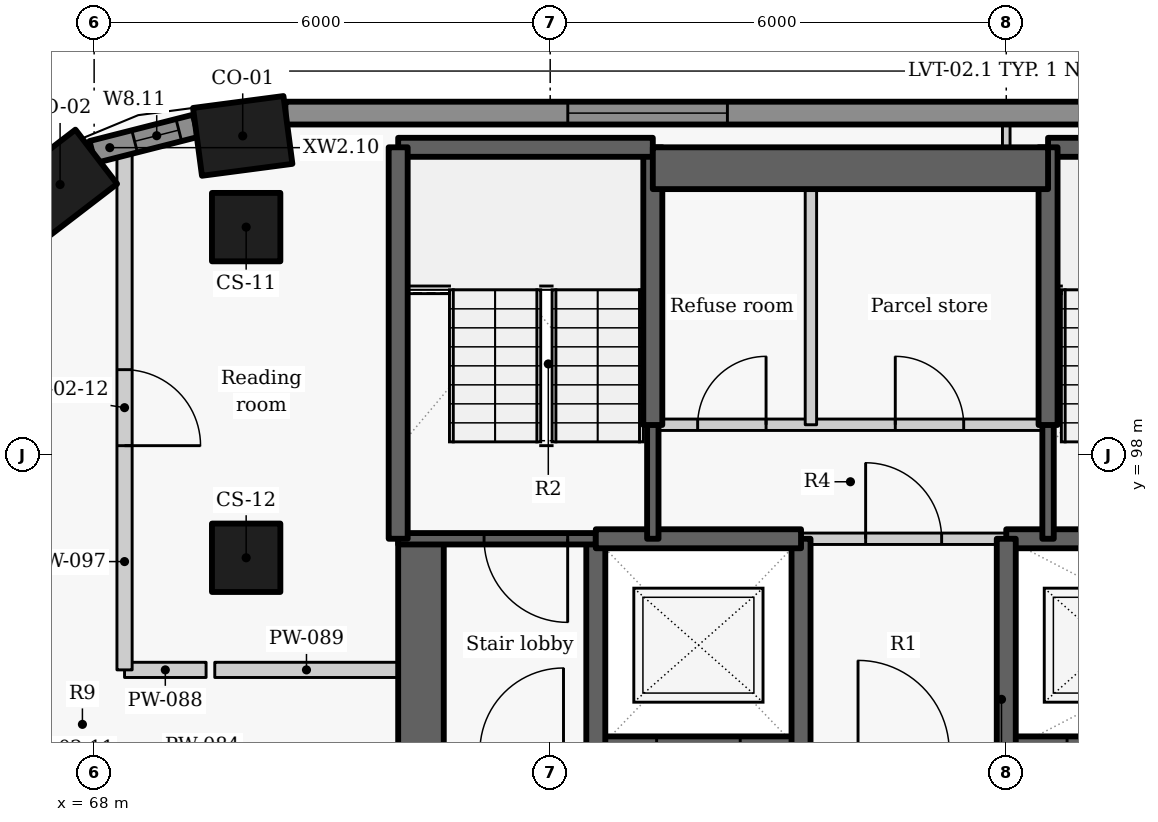
"""IFC4 building model, lengths in metres.
Left out: names, types, materials, properties, quantities, classifications, styles, units other than length and angle.
Written with IfcOpenShell. Run it as: python <this file> out.ifc"""

import sys

from ifc_helpers import new_model, si_unit, direction, frame, frame_2d, origin, origin_2d, place, context, subcontext, project, spatial, rectangle, extrude, element, fill, save


model = new_model("IFC4")
c1 = context("Model", 3, precision=1e-05, world=origin(), true_north=direction((0.0, 1.0)))
c2 = subcontext(c1, "Body", "Model", "MODEL_VIEW")
j1 = project(units=[si_unit("LENGTHUNIT", "METRE"), si_unit("PLANEANGLEUNIT", "RADIAN")], contexts=[c1])
p1 = place(None, origin())
s1 = spatial("IfcSite", under=j1, at=p1, CompositionType="ELEMENT")
p2 = place(p1, origin())
s2 = spatial("IfcBuilding", under=s1, at=p2, CompositionType="ELEMENT")
p3 = place(p2, frame((0.0, 0.0, 213.0)))
s3 = spatial("IfcBuildingStorey", under=s2, at=p3, CompositionType="ELEMENT", Elevation=213.0)
for number, where, z_axis, x_axis in (
    (1, (69.955, 102.2, 0.0), (0.0, 0.0, 1.0), (-0.991, -0.131, 0.0)),
    (2, (67.552, 101.56, 0.0), (0.0, 0.0, 1.0), (-0.793, -0.609, 0.0)),
):
    element("IfcColumn", number, at=place(p3, frame(where, z_axis=z_axis, x_axis=x_axis)), inside=s3, PredefinedType="COLUMN", context=c2, shape_type="SweptSolid", body=[
        extrude(rectangle(XDim=1.2, YDim=0.9, at=origin_2d()), origin(), (0.0, 0.0, 1.0), 3.3),
    ])
for number, where, z_axis, x_axis in (
    (3, (70.0, 101.0, 0.0), (0.0, 0.0, 1.0), (0.0, -1.0, 0.0)),
    (4, (70.0, 96.65, 0.0), (0.0, 0.0, 1.0), (0.0, -1.0, 0.0)),
):
    element("IfcColumn", number, at=place(p3, frame(where, z_axis=z_axis, x_axis=x_axis)), inside=s3, PredefinedType="COLUMN", context=c2, shape_type="SweptSolid", body=[
        extrude(rectangle(XDim=0.9, YDim=0.9, at=origin_2d()), origin(), (0.0, 0.0, 1.0), 3.3),
    ])
p4 = place(p3, frame((89.449, 102.5, 0.0), z_axis=(0.0, 0.0, 1.0), x_axis=(-1.0, 0.0, 0.0)))
e5 = element("IfcWall", 5, at=p4, inside=s3, PredefinedType="SOLIDWALL", context=c2, shape_type="SweptSolid", body=[
    extrude(rectangle(XDim=18.933, YDim=0.3, at=frame_2d((9.466, 0.0))), origin(), (0.0, 0.0, 1.0), 2.425),
])
p5 = place(p4, frame((3.687, 0.0, 0.9)))
e6 = element("IfcOpeningElement", 6, at=p5, cuts=e5, PredefinedType="OPENING", context=c2, shape_type="SweptSolid", body=[
    extrude(rectangle(XDim=2.1, YDim=1.1, at=frame_2d((1.05, 0.55))), frame((0.0, 0.16, 0.0), z_axis=(0.0, -1.0, 0.0), x_axis=(1.0, 0.0, 0.0)), (0.0, 0.0, 1.0), 0.32),
])
p6 = place(p4, frame((13.118, 0.0, 0.9)))
e7 = element("IfcOpeningElement", 7, at=p6, cuts=e5, PredefinedType="OPENING", context=c2, shape_type="SweptSolid", body=[
    extrude(rectangle(XDim=2.1, YDim=1.1, at=frame_2d((1.05, 0.55))), frame((0.0, 0.16, 0.0), z_axis=(0.0, -1.0, 0.0), x_axis=(1.0, 0.0, 0.0)), (0.0, 0.0, 1.0), 0.32),
])
p7 = place(p3, frame((69.336, 102.333, 0.0), z_axis=(0.0, 0.0, 1.0), x_axis=(-0.969037396898, -0.246914000036, 0.0)))
e8 = element("IfcWall", 8, at=p7, inside=s3, PredefinedType="SOLIDWALL", context=c2, shape_type="SweptSolid", body=[
    extrude(rectangle(XDim=1.403, YDim=0.3, at=frame_2d((0.702, 0.0))), origin(), (0.0, 0.0, 1.0), 2.425),
])
p8 = place(p7, frame((0.229, 0.0, 0.9)))
e9 = element("IfcOpeningElement", 9, at=p8, cuts=e8, PredefinedType="OPENING", context=c2, shape_type="SweptSolid", body=[
    extrude(rectangle(XDim=0.6, YDim=1.1, at=frame_2d((0.3, 0.55))), frame((0.0, 0.16, 0.0), z_axis=(0.0, -1.0, 0.0), x_axis=(1.0, 0.0, 0.0)), (0.0, 0.0, 1.0), 0.32),
])
p9 = place(p3, frame((72.3, 87.8, -0.275), z_axis=(0.0, 0.0, 1.0), x_axis=(0.0, 1.0, 0.0)))
e10 = element("IfcWall", 10, at=p9, inside=s3, PredefinedType="SHEAR", context=c2, shape_type="SweptSolid", body=[
    extrude(rectangle(XDim=9.1, YDim=0.6, at=frame_2d((4.55, 0.0))), origin(), (0.0, 0.0, 1.0), 3.3),
])
p10 = place(p9, frame((3.852, 0.0, 0.275)))
e11 = element("IfcOpeningElement", 11, at=p10, cuts=e10, PredefinedType="OPENING", context=c2, shape_type="SweptSolid", body=[
    extrude(rectangle(XDim=1.5, YDim=2.1, at=frame_2d((0.75, 1.05))), frame((0.0, 0.31, 0.0), z_axis=(0.0, -1.0, 0.0), x_axis=(1.0, 0.0, 0.0)), (0.0, 0.0, 1.0), 0.62),
])
p11 = place(p3, frame((74.597, 94.1, -0.275), z_axis=(0.0, 0.0, 1.0), x_axis=(1.0, 0.0, 0.0)))
e12 = element("IfcWall", 12, at=p11, inside=s3, PredefinedType="SHEAR", context=c2, shape_type="SweptSolid", body=[
    extrude(rectangle(XDim=2.706, YDim=0.4, at=frame_2d((1.353, 0.0))), origin(), (0.0, 0.0, 1.0), 3.3),
])
p12 = place(p11, frame((0.803, 0.0, 0.275)))
e13 = element("IfcOpeningElement", 13, at=p12, cuts=e12, PredefinedType="OPENING", context=c2, shape_type="SweptSolid", body=[
    extrude(rectangle(XDim=1.1, YDim=2.1, at=frame_2d((0.55, 1.05))), frame((0.0, 0.21, 0.0), z_axis=(0.0, -1.0, 0.0), x_axis=(1.0, 0.0, 0.0)), (0.0, 0.0, 1.0), 0.42),
])
p13 = place(p3, frame((79.997, 94.1, -0.275), z_axis=(0.0, 0.0, 1.0), x_axis=(1.0, 0.0, 0.0)))
e14 = element("IfcWall", 14, at=p13, inside=s3, PredefinedType="SHEAR", context=c2, shape_type="SweptSolid", body=[
    extrude(rectangle(XDim=5.406, YDim=0.4, at=frame_2d((2.703, 0.0))), origin(), (0.0, 0.0, 1.0), 3.3),
])
p14 = place(p13, frame((0.803, 0.0, 0.275)))
e15 = element("IfcOpeningElement", 15, at=p14, cuts=e14, PredefinedType="OPENING", context=c2, shape_type="SweptSolid", body=[
    extrude(rectangle(XDim=1.1, YDim=2.1, at=frame_2d((0.55, 1.05))), frame((0.0, 0.21, 0.0), z_axis=(0.0, -1.0, 0.0), x_axis=(1.0, 0.0, 0.0)), (0.0, 0.0, 1.0), 0.42),
])
p15 = place(p3, frame((74.6, 94.1, -0.275), z_axis=(0.0, 0.0, 1.0), x_axis=(0.0, 1.0, 0.0)))
e16 = element("IfcWall", 16, at=p15, inside=s3, PredefinedType="SHEAR", context=c2, shape_type="SweptSolid", body=[
    extrude(rectangle(XDim=2.8, YDim=0.25, at=frame_2d((1.4, 0.0))), origin(), (0.0, 0.0, 1.0), 3.3),
])
p16 = place(p3, frame((74.6, 96.9, -0.275), z_axis=(0.0, 0.0, 1.0), x_axis=(-1.0, 0.0, 0.0)))
e17 = element("IfcWall", 17, at=p16, inside=s3, PredefinedType="SHEAR", context=c2, shape_type="SweptSolid", body=[
    extrude(rectangle(XDim=2.6, YDim=0.15, at=frame_2d((1.3, 0.0))), origin(), (0.0, 0.0, 1.0), 3.3),
])
p17 = place(p16, frame((0.37, 0.0, 0.275)))
e18 = element("IfcOpeningElement", 18, at=p17, cuts=e17, PredefinedType="OPENING", context=c2, shape_type="SweptSolid", body=[
    extrude(rectangle(XDim=1.1, YDim=2.1, at=frame_2d((0.55, 1.05))), frame((0.0, 0.085, 0.0), z_axis=(0.0, -1.0, 0.0), x_axis=(1.0, 0.0, 0.0)), (0.0, 0.0, 1.0), 0.17),
])
p18 = place(p3, frame((77.3, 94.1, -0.275), z_axis=(0.0, 0.0, 1.0), x_axis=(0.0, 1.0, 0.0)))
e19 = element("IfcWall", 19, at=p18, inside=s3, PredefinedType="SHEAR", context=c2, shape_type="SweptSolid", body=[
    extrude(rectangle(XDim=2.8, YDim=0.25, at=frame_2d((1.4, 0.0))), origin(), (0.0, 0.0, 1.0), 3.3),
])
p19 = place(p3, frame((74.6, 96.9, -0.275), z_axis=(0.0, 0.0, 1.0), x_axis=(1.0, 0.0, 0.0)))
e20 = element("IfcWall", 20, at=p19, inside=s3, PredefinedType="SHEAR", context=c2, shape_type="SweptSolid", body=[
    extrude(rectangle(XDim=2.7, YDim=0.25, at=frame_2d((1.35, 0.0))), origin(), (0.0, 0.0, 1.0), 3.3),
])
p20 = place(p3, frame((80.0, 96.9, -0.275), z_axis=(0.0, 0.0, 1.0), x_axis=(1.0, 0.0, 0.0)))
e21 = element("IfcWall", 21, at=p20, inside=s3, PredefinedType="SHEAR", context=c2, shape_type="SweptSolid", body=[
    extrude(rectangle(XDim=8.0, YDim=0.25, at=frame_2d((4.0, 0.0))), origin(), (0.0, 0.0, 1.0), 3.3),
])
p21 = place(p20, frame((3.849, 0.0, 0.275)))
e22 = element("IfcOpeningElement", 22, at=p21, cuts=e21, PredefinedType="OPENING", context=c2, shape_type="SweptSolid", body=[
    extrude(rectangle(XDim=1.1, YDim=2.1, at=frame_2d((0.55, 1.05))), frame((0.0, 0.135, 0.0), z_axis=(0.0, -1.0, 0.0), x_axis=(1.0, 0.0, 0.0)), (0.0, 0.0, 1.0), 0.27),
])
p22 = place(p3, frame((80.0, 94.1, -0.275), z_axis=(0.0, 0.0, 1.0), x_axis=(0.0, 1.0, 0.0)))
e23 = element("IfcWall", 23, at=p22, inside=s3, PredefinedType="SHEAR", context=c2, shape_type="SweptSolid", body=[
    extrude(rectangle(XDim=2.8, YDim=0.25, at=frame_2d((1.4, 0.0))), origin(), (0.0, 0.0, 1.0), 3.3),
])
p23 = place(p3, frame((77.3, 96.9, 0.0), z_axis=(0.0, 0.0, 1.0), x_axis=(1.0, 0.0, 0.0)))
e24 = element("IfcWall", 24, at=p23, inside=s3, PredefinedType="PARTITIONING", context=c2, shape_type="SweptSolid", body=[
    extrude(rectangle(XDim=2.7, YDim=0.15, at=frame_2d((1.35, 0.0))), origin(), (0.0, 0.0, 1.0), 3.025),
])
p24 = place(p23, frame((0.85, 0.0, 0.0)))
e25 = element("IfcOpeningElement", 25, at=p24, cuts=e24, PredefinedType="OPENING", context=c2, shape_type="SweptSolid", body=[
    extrude(rectangle(XDim=1.0, YDim=2.1, at=frame_2d((0.5, 1.05))), frame((0.0, 0.085, 0.0), z_axis=(0.0, -1.0, 0.0), x_axis=(1.0, 0.0, 0.0)), (0.0, 0.0, 1.0), 0.17),
])
p25 = place(p3, frame((75.35, 96.9, -0.275), z_axis=(0.0, 0.0, 1.0), x_axis=(0.0, 1.0, 0.0)))
e26 = element("IfcWall", 26, at=p25, inside=s3, PredefinedType="SHEAR", context=c2, shape_type="SweptSolid", body=[
    extrude(rectangle(XDim=1.503, YDim=0.15, at=frame_2d((0.751, 0.0))), origin(), (0.0, 0.0, 1.0), 3.3),
])
p26 = place(p3, frame((75.35, 98.397, -0.275), z_axis=(0.0, 0.0, 1.0), x_axis=(0.0, 1.0, 0.0)))
e27 = element("IfcWall", 27, at=p26, inside=s3, PredefinedType="SHEAR", context=c2, shape_type="SweptSolid", body=[
    extrude(rectangle(XDim=3.653, YDim=0.25, at=frame_2d((1.827, 0.0))), origin(), (0.0, 0.0, 1.0), 3.3),
])
p27 = place(p3, frame((72.0, 102.05, -0.275), z_axis=(0.0, 0.0, 1.0), x_axis=(1.0, 0.0, 0.0)))
e28 = element("IfcWall", 28, at=p27, inside=s3, PredefinedType="SHEAR", context=c2, shape_type="SweptSolid", body=[
    extrude(rectangle(XDim=3.35, YDim=0.25, at=frame_2d((1.675, 0.0))), origin(), (0.0, 0.0, 1.0), 3.3),
])
p28 = place(p3, frame((80.55, 102.05, -0.275), z_axis=(0.0, 0.0, 1.0), x_axis=(1.0, 0.0, 0.0)))
e29 = element("IfcWall", 29, at=p28, inside=s3, PredefinedType="SHEAR", context=c2, shape_type="SweptSolid", body=[
    extrude(rectangle(XDim=2.85, YDim=0.25, at=frame_2d((1.425, 0.0))), origin(), (0.0, 0.0, 1.0), 3.3),
])
p29 = place(p3, frame((72.0, 96.9, -0.275), z_axis=(0.0, 0.0, 1.0), x_axis=(0.0, 1.0, 0.0)))
e30 = element("IfcWall", 30, at=p29, inside=s3, PredefinedType="SHEAR", context=c2, shape_type="SweptSolid", body=[
    extrude(rectangle(XDim=5.15, YDim=0.25, at=frame_2d((2.575, 0.0))), origin(), (0.0, 0.0, 1.0), 3.3),
])
p30 = place(p3, frame((80.55, 96.9, -0.275), z_axis=(0.0, 0.0, 1.0), x_axis=(0.0, 1.0, 0.0)))
e31 = element("IfcWall", 31, at=p30, inside=s3, PredefinedType="SHEAR", context=c2, shape_type="SweptSolid", body=[
    extrude(rectangle(XDim=1.503, YDim=0.15, at=frame_2d((0.751, 0.0))), origin(), (0.0, 0.0, 1.0), 3.3),
])
p31 = place(p3, frame((80.55, 98.397, -0.275), z_axis=(0.0, 0.0, 1.0), x_axis=(0.0, 1.0, 0.0)))
e32 = element("IfcWall", 32, at=p31, inside=s3, PredefinedType="SHEAR", context=c2, shape_type="SweptSolid", body=[
    extrude(rectangle(XDim=3.653, YDim=0.25, at=frame_2d((1.827, 0.0))), origin(), (0.0, 0.0, 1.0), 3.3),
])
p32 = place(p3, frame((75.35, 101.775, -0.275), z_axis=(0.0, 0.0, 1.0), x_axis=(1.0, 0.0, 0.0)))
e33 = element("IfcWall", 33, at=p32, inside=s3, PredefinedType="SHEAR", context=c2, shape_type="SweptSolid", body=[
    extrude(rectangle(XDim=5.2, YDim=0.55, at=frame_2d((2.6, 0.0))), origin(), (0.0, 0.0, 1.0), 3.3),
])
p33 = place(p3, frame((75.35, 98.4, 0.0), z_axis=(0.0, 0.0, 1.0), x_axis=(1.0, 0.0, 0.0)))
e34 = element("IfcWall", 34, at=p33, inside=s3, PredefinedType="PARTITIONING", context=c2, shape_type="SweptSolid", body=[
    extrude(rectangle(XDim=5.2, YDim=0.15, at=frame_2d((2.6, 0.0))), origin(), (0.0, 0.0, 1.0), 3.025),
])
p34 = place(p33, frame((0.59, 0.0, 0.0)))
e35 = element("IfcOpeningElement", 35, at=p34, cuts=e34, PredefinedType="OPENING", context=c2, shape_type="SweptSolid", body=[
    extrude(rectangle(XDim=0.9, YDim=2.1, at=frame_2d((0.45, 1.05))), frame((0.0, 0.085, 0.0), z_axis=(0.0, -1.0, 0.0), x_axis=(1.0, 0.0, 0.0)), (0.0, 0.0, 1.0), 0.17),
])
p35 = place(p33, frame((3.19, 0.0, 0.0)))
e36 = element("IfcOpeningElement", 36, at=p35, cuts=e34, PredefinedType="OPENING", context=c2, shape_type="SweptSolid", body=[
    extrude(rectangle(XDim=0.9, YDim=2.1, at=frame_2d((0.45, 1.05))), frame((0.0, 0.085, 0.0), z_axis=(0.0, -1.0, 0.0), x_axis=(1.0, 0.0, 0.0)), (0.0, 0.0, 1.0), 0.17),
])
p36 = place(p3, frame((77.43, 98.4, 0.0), z_axis=(0.0, 0.0, 1.0), x_axis=(0.0, 1.0, 0.0)))
e37 = element("IfcWall", 37, at=p36, inside=s3, PredefinedType="PARTITIONING", context=c2, shape_type="SweptSolid", body=[
    extrude(rectangle(XDim=3.65, YDim=0.15, at=frame_2d((1.825, 0.0))), origin(), (0.0, 0.0, 1.0), 3.025),
])
p37 = place(p3, frame((68.4, 95.175, 0.0), z_axis=(0.0, 0.0, 1.0), x_axis=(1.0, 0.0, 0.0)))
e38 = element("IfcWall", 38, at=p37, inside=s3, PredefinedType="PARTITIONING", context=c2, shape_type="SweptSolid", body=[
    extrude(rectangle(XDim=1.073, YDim=0.2, at=frame_2d((0.537, 0.0))), origin(), (0.0, 0.0, 1.0), 3.025),
])
p38 = place(p3, frame((69.587, 95.175, 0.0), z_axis=(0.0, 0.0, 1.0), x_axis=(1.0, 0.0, 0.0)))
e39 = element("IfcWall", 39, at=p38, inside=s3, PredefinedType="PARTITIONING", context=c2, shape_type="SweptSolid", body=[
    extrude(rectangle(XDim=2.413, YDim=0.2, at=frame_2d((1.207, 0.0))), origin(), (0.0, 0.0, 1.0), 2.505),
])
p39 = place(p3, frame((68.4, 102.074, 0.0), z_axis=(0.0, 0.0, 1.0), x_axis=(0.0, -1.0, 0.0)))
e40 = element("IfcWall", 40, at=p39, inside=s3, PredefinedType="PARTITIONING", context=c2, shape_type="SweptSolid", body=[
    extrude(rectangle(XDim=6.899, YDim=0.2, at=frame_2d((3.449, 0.0))), origin(), (0.0, 0.0, 1.0), 2.405),
])
p40 = place(p39, frame((2.949, 0.0, 0.0)))
e41 = element("IfcOpeningElement", 41, at=p40, cuts=e40, PredefinedType="OPENING", context=c2, shape_type="SweptSolid", body=[
    extrude(rectangle(XDim=1.0, YDim=2.1, at=frame_2d((0.5, 1.05))), frame((0.0, 0.11, 0.0), z_axis=(0.0, -1.0, 0.0), x_axis=(1.0, 0.0, 0.0)), (0.0, 0.0, 1.0), 0.22),
])
p41 = place(p3, frame((80.0, 102.05, 0.0), z_axis=(0.0, 0.0, 1.0), x_axis=(0.0, 1.0, 0.0)))
e42 = element("IfcWall", 42, at=p41, inside=s3, PredefinedType="PARTITIONING", context=c2, shape_type="SweptSolid", body=[
    extrude(rectangle(XDim=0.3, YDim=0.1, at=frame_2d((0.15, 0.0))), origin(), (0.0, 0.0, 1.0), 3.025),
])
p42 = place(p6, origin())
e43 = element("IfcWindow", 43, at=p42, inside=s3, PartitioningType="SINGLE_PANEL", PredefinedType="WINDOW", context=c2, shape_type="SweptSolid", body=[
    extrude(rectangle(XDim=2.1, YDim=1.1, at=frame_2d((1.05, 0.55))), frame((0.0, 0.03, 0.0), z_axis=(0.0, -1.0, 0.0), x_axis=(1.0, 0.0, 0.0)), (0.0, 0.0, 1.0), 0.06),
])
fill(e7, e43)
p43 = place(p8, origin())
e44 = element("IfcWindow", 44, at=p43, inside=s3, PartitioningType="SINGLE_PANEL", PredefinedType="WINDOW", context=c2, shape_type="SweptSolid", body=[
    extrude(rectangle(XDim=0.6, YDim=1.1, at=frame_2d((0.3, 0.55))), frame((0.0, 0.03, 0.0), z_axis=(0.0, -1.0, 0.0), x_axis=(1.0, 0.0, 0.0)), (0.0, 0.0, 1.0), 0.06),
])
fill(e9, e44)
p44 = place(p24, origin())
e45 = element("IfcDoor", 45, at=p44, inside=s3, OperationType="SINGLE_SWING_LEFT", PredefinedType="DOOR", context=c2, shape_type="SweptSolid", body=[
    extrude(rectangle(XDim=1.0, YDim=2.1, at=frame_2d((0.5, 1.05))), frame((0.0, 0.025, 0.0), z_axis=(0.0, -1.0, 0.0), x_axis=(1.0, 0.0, 0.0)), (0.0, 0.0, 1.0), 0.05),
])
fill(e25, e45)
p45 = place(p34, origin())
e46 = element("IfcDoor", 46, at=p45, inside=s3, OperationType="SINGLE_SWING_RIGHT", PredefinedType="DOOR", context=c2, shape_type="SweptSolid", body=[
    extrude(rectangle(XDim=0.9, YDim=2.1, at=frame_2d((0.45, 1.05))), frame((0.0, 0.025, 0.0), z_axis=(0.0, -1.0, 0.0), x_axis=(1.0, 0.0, 0.0)), (0.0, 0.0, 1.0), 0.05),
])
fill(e35, e46)
p46 = place(p35, origin())
e47 = element("IfcDoor", 47, at=p46, inside=s3, OperationType="SINGLE_SWING_LEFT", PredefinedType="DOOR", context=c2, shape_type="SweptSolid", body=[
    extrude(rectangle(XDim=0.9, YDim=2.1, at=frame_2d((0.45, 1.05))), frame((0.0, 0.025, 0.0), z_axis=(0.0, -1.0, 0.0), x_axis=(1.0, 0.0, 0.0)), (0.0, 0.0, 1.0), 0.05),
])
fill(e36, e47)
p47 = place(p17, origin())
e48 = element("IfcDoor", 48, at=p47, inside=s3, OperationType="SINGLE_SWING_LEFT", PredefinedType="DOOR", context=c2, shape_type="SweptSolid", body=[
    extrude(rectangle(XDim=1.1, YDim=2.1, at=frame_2d((0.55, 1.05))), frame((0.0, 0.025, 0.0), z_axis=(0.0, -1.0, 0.0), x_axis=(1.0, 0.0, 0.0)), (0.0, 0.0, 1.0), 0.05),
])
fill(e18, e48)
p48 = place(p40, origin())
e49 = element("IfcDoor", 49, at=p48, inside=s3, OperationType="SINGLE_SWING_RIGHT", PredefinedType="DOOR", context=c2, shape_type="SweptSolid", body=[
    extrude(rectangle(XDim=1.0, YDim=2.1, at=frame_2d((0.5, 1.05))), frame((0.0, 0.025, 0.0), z_axis=(0.0, -1.0, 0.0), x_axis=(1.0, 0.0, 0.0)), (0.0, 0.0, 1.0), 0.05),
])
fill(e41, e49)
save(model, sys.argv[1])
